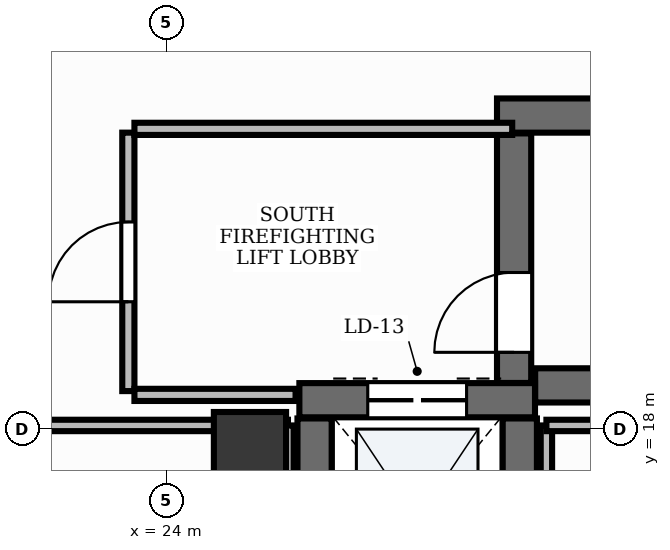
"""IFC4 building model, lengths in metres.
Left out: names, types, materials, properties, quantities, classifications, styles, units other than length and angle.
Written with IfcOpenShell. Run it as: python <this file> out.ifc"""

import sys

from ifc_helpers import new_model, si_unit, direction, frame, frame_2d, origin, origin_2d, place, context, subcontext, project, spatial, rectangle, extrude, element, fill, save


model = new_model("IFC4")
c1 = context("Model", 3, precision=1e-05, world=origin(), true_north=direction((0.0, 1.0)))
c2 = subcontext(c1, "Body", "Model", "MODEL_VIEW")
j1 = project(units=[si_unit("LENGTHUNIT", "METRE"), si_unit("PLANEANGLEUNIT", "RADIAN")], contexts=[c1])
p1 = place(None, origin())
s1 = spatial("IfcSite", under=j1, at=p1, CompositionType="ELEMENT")
p2 = place(p1, origin())
s2 = spatial("IfcBuilding", under=s1, at=p2, CompositionType="ELEMENT")
p3 = place(p2, frame((0.0, 0.0, 123.6)))
s3 = spatial("IfcBuildingStorey", under=s2, at=p3, CompositionType="ELEMENT", Elevation=123.6)
p4 = place(p3, frame((28.852, 18.575, 0.0), z_axis=(0.0, 0.0, 1.0), x_axis=(1.0, 0.0, 0.0)))
e1 = element("IfcWall", 1, at=p4, inside=s3, PredefinedType="SHEAR", context=c2, shape_type="SweptSolid", body=[
    extrude(rectangle(XDim=8.248, YDim=0.45, at=frame_2d((4.124, 0.0))), origin(), (0.0, 0.0, 1.0), 3.9),
])
p5 = place(p3, frame((28.35, 22.125, 0.0), z_axis=(0.0, 0.0, 1.0), x_axis=(1.0, 0.0, 0.0)))
e2 = element("IfcWall", 2, at=p5, inside=s3, PredefinedType="SHEAR", context=c2, shape_type="SweptSolid", body=[
    extrude(rectangle(XDim=8.75, YDim=0.45, at=frame_2d((4.375, 0.0))), origin(), (0.0, 0.0, 1.0), 3.9),
])
p6 = place(p3, frame((28.575, 18.607, 0.0), z_axis=(0.0, 0.0, 1.0), x_axis=(0.0, 1.0, 0.0)))
e3 = element("IfcWall", 3, at=p6, inside=s3, PredefinedType="SHEAR", context=c2, shape_type="SweptSolid", body=[
    extrude(rectangle(XDim=3.283, YDim=0.45, at=frame_2d((1.642, 0.0))), origin(), (0.0, 0.0, 1.0), 3.9),
])
p7 = place(p6, frame((0.403, 0.0, 0.0)))
e4 = element("IfcOpeningElement", 4, at=p7, cuts=e3, PredefinedType="OPENING", context=c2, shape_type="SweptSolid", body=[
    extrude(rectangle(XDim=1.05, YDim=2.15, at=frame_2d((0.525, 1.075))), frame((0.0, 0.24, 0.0), z_axis=(0.0, -1.0, 0.0), x_axis=(1.0, 0.0, 0.0)), (0.0, 0.0, 1.0), 0.48),
])
p8 = place(p3, frame((25.75, 18.38, 0.0), z_axis=(0.0, 0.0, 1.0), x_axis=(1.0, 0.0, 0.0)))
e5 = element("IfcWall", 5, at=p8, inside=s3, PredefinedType="SHEAR", context=c2, shape_type="SweptSolid", body=[
    extrude(rectangle(XDim=3.1, YDim=0.45, at=frame_2d((1.55, 0.0))), origin(), (0.0, 0.0, 1.0), 3.9),
])
p9 = place(p8, frame((0.9, 0.0, 0.0)))
e6 = element("IfcOpeningElement", 6, at=p9, cuts=e5, PredefinedType="OPENING", context=c2, shape_type="SweptSolid", body=[
    extrude(rectangle(XDim=1.3, YDim=2.2, at=frame_2d((0.65, 1.1))), frame((0.0, 0.24, 0.0), z_axis=(0.0, -1.0, 0.0), x_axis=(1.0, 0.0, 0.0)), (0.0, 0.0, 1.0), 0.48),
])
for number, where, z_axis, x_axis in (
    (7, (25.95, 15.44, 0.0), (0.0, 0.0, 1.0), (0.0, 1.0, 0.0)),
    (8, (28.65, 15.44, 0.0), (0.0, 0.0, 1.0), (0.0, 1.0, 0.0)),
):
    element("IfcWall", number, at=place(p3, frame(where, z_axis=z_axis, x_axis=x_axis)), inside=s3, PredefinedType="SHEAR", context=c2, shape_type="SweptSolid", body=[
        extrude(rectangle(XDim=2.7, YDim=0.45, at=frame_2d((1.35, 0.0))), origin(), (0.0, 0.0, 1.0), 3.9),
    ])
p10 = place(p3, frame((25.1, 17.75, -0.0), z_axis=(0.0, 0.0, 1.0), x_axis=(1.0, 0.0, 0.0)))
e9 = element("IfcColumn", 9, at=p10, inside=s3, PredefinedType="PILASTER", context=c2, shape_type="SweptSolid", body=[
    extrude(rectangle(XDim=0.95, YDim=0.95, at=origin_2d()), origin(), (0.0, 0.0, 1.0), 3.901),
])
p11 = place(p3, frame((23.5, 18.5, 0.0), z_axis=(0.0, 0.0, 1.0), x_axis=(0.0, 1.0, 0.0)))
e10 = element("IfcWall", 10, at=p11, inside=s3, PredefinedType="PARTITIONING", context=c2, shape_type="SweptSolid", body=[
    extrude(rectangle(XDim=3.4, YDim=0.16, at=frame_2d((1.7, 0.0))), origin(), (0.0, 0.0, 1.0), 2.91),
])
p12 = place(p11, frame((1.175, 0.0, 0.0)))
e11 = element("IfcOpeningElement", 11, at=p12, cuts=e10, PredefinedType="OPENING", context=c2, shape_type="SweptSolid", body=[
    extrude(rectangle(XDim=1.05, YDim=2.15, at=frame_2d((0.525, 1.075))), frame((0.0, 0.095, 0.0), z_axis=(0.0, -1.0, 0.0), x_axis=(1.0, 0.0, 0.0)), (0.0, 0.0, 1.0), 0.19),
])
p13 = place(p3, frame((23.58, 21.95, 0.0), z_axis=(0.0, 0.0, 1.0), x_axis=(1.0, 0.0, 0.0)))
e12 = element("IfcWall", 12, at=p13, inside=s3, PredefinedType="PARTITIONING", context=c2, shape_type="SweptSolid", body=[
    extrude(rectangle(XDim=4.97, YDim=0.16, at=frame_2d((2.485, 0.0))), origin(), (0.0, 0.0, 1.0), 2.91),
])
p14 = place(p3, frame((23.58, 18.45, 0.0), z_axis=(0.0, 0.0, 1.0), x_axis=(1.0, 0.0, 0.0)))
e13 = element("IfcWall", 13, at=p14, inside=s3, PredefinedType="PARTITIONING", context=c2, shape_type="SweptSolid", body=[
    extrude(rectangle(XDim=2.12, YDim=0.16, at=frame_2d((1.06, 0.0))), origin(), (0.0, 0.0, 1.0), 2.91),
])
p15 = place(p3, frame((19.841, 18.048, 0.0), z_axis=(0.0, 0.0, 1.0), x_axis=(1.0, 0.0, 0.0)))
e14 = element("IfcWall", 14, at=p15, inside=s3, PredefinedType="PARTITIONING", context=c2, shape_type="SweptSolid", body=[
    extrude(rectangle(XDim=5.759, YDim=0.15, at=frame_2d((2.879, 0.0))), origin(), (0.0, 0.0, 1.0), 2.91),
])
for number, where, z_axis, x_axis in (
    (15, (25.6, 18.048, 0.0), (0.0, 0.0, 1.0), (0.0, -1.0, 0.0)),
    (16, (29.0, 14.954, 0.0), (0.0, 0.0, 1.0), (0.0, 1.0, 0.0)),
):
    element("IfcWall", number, at=place(p3, frame(where, z_axis=z_axis, x_axis=x_axis)), inside=s3, PredefinedType="PARTITIONING", context=c2, shape_type="SweptSolid", body=[
        extrude(rectangle(XDim=3.094, YDim=0.15, at=frame_2d((1.547, 0.0))), origin(), (0.0, 0.0, 1.0), 2.91),
    ])
p16 = place(p3, frame((29.0, 18.048, 0.0), z_axis=(0.0, 0.0, 1.0), x_axis=(1.0, 0.0, 0.0)))
e17 = element("IfcWall", 17, at=p16, inside=s3, PredefinedType="PARTITIONING", context=c2, shape_type="SweptSolid", body=[
    extrude(rectangle(XDim=7.906, YDim=0.15, at=frame_2d((3.953, 0.0))), origin(), (0.0, 0.0, 1.0), 2.91),
])
p17 = place(p7, origin())
e18 = element("IfcDoor", 18, at=p17, inside=s3, OperationType="SINGLE_SWING_LEFT", PredefinedType="DOOR", context=c2, shape_type="SweptSolid", body=[
    extrude(rectangle(XDim=1.05, YDim=2.15, at=frame_2d((0.525, 1.075))), frame((0.0, 0.025, 0.0), z_axis=(0.0, -1.0, 0.0), x_axis=(1.0, 0.0, 0.0)), (0.0, 0.0, 1.0), 0.05),
])
fill(e4, e18)
p18 = place(p9, origin())
e19 = element("IfcDoor", 19, at=p18, inside=s3, OperationType="DOUBLE_DOOR_SLIDING", PredefinedType="DOOR", context=c2, shape_type="SweptSolid", body=[
    extrude(rectangle(XDim=1.3, YDim=2.2, at=frame_2d((0.65, 1.1))), frame((0.0, 0.025, 0.0), z_axis=(0.0, -1.0, 0.0), x_axis=(1.0, 0.0, 0.0)), (0.0, 0.0, 1.0), 0.05),
])
fill(e6, e19)
p19 = place(p12, origin())
e20 = element("IfcDoor", 20, at=p19, inside=s3, OperationType="SINGLE_SWING_LEFT", PredefinedType="DOOR", context=c2, shape_type="SweptSolid", body=[
    extrude(rectangle(XDim=1.05, YDim=2.15, at=frame_2d((0.525, 1.075))), frame((0.0, 0.025, 0.0), z_axis=(0.0, -1.0, 0.0), x_axis=(1.0, 0.0, 0.0)), (0.0, 0.0, 1.0), 0.05),
])
fill(e11, e20)
save(model, sys.argv[1])
